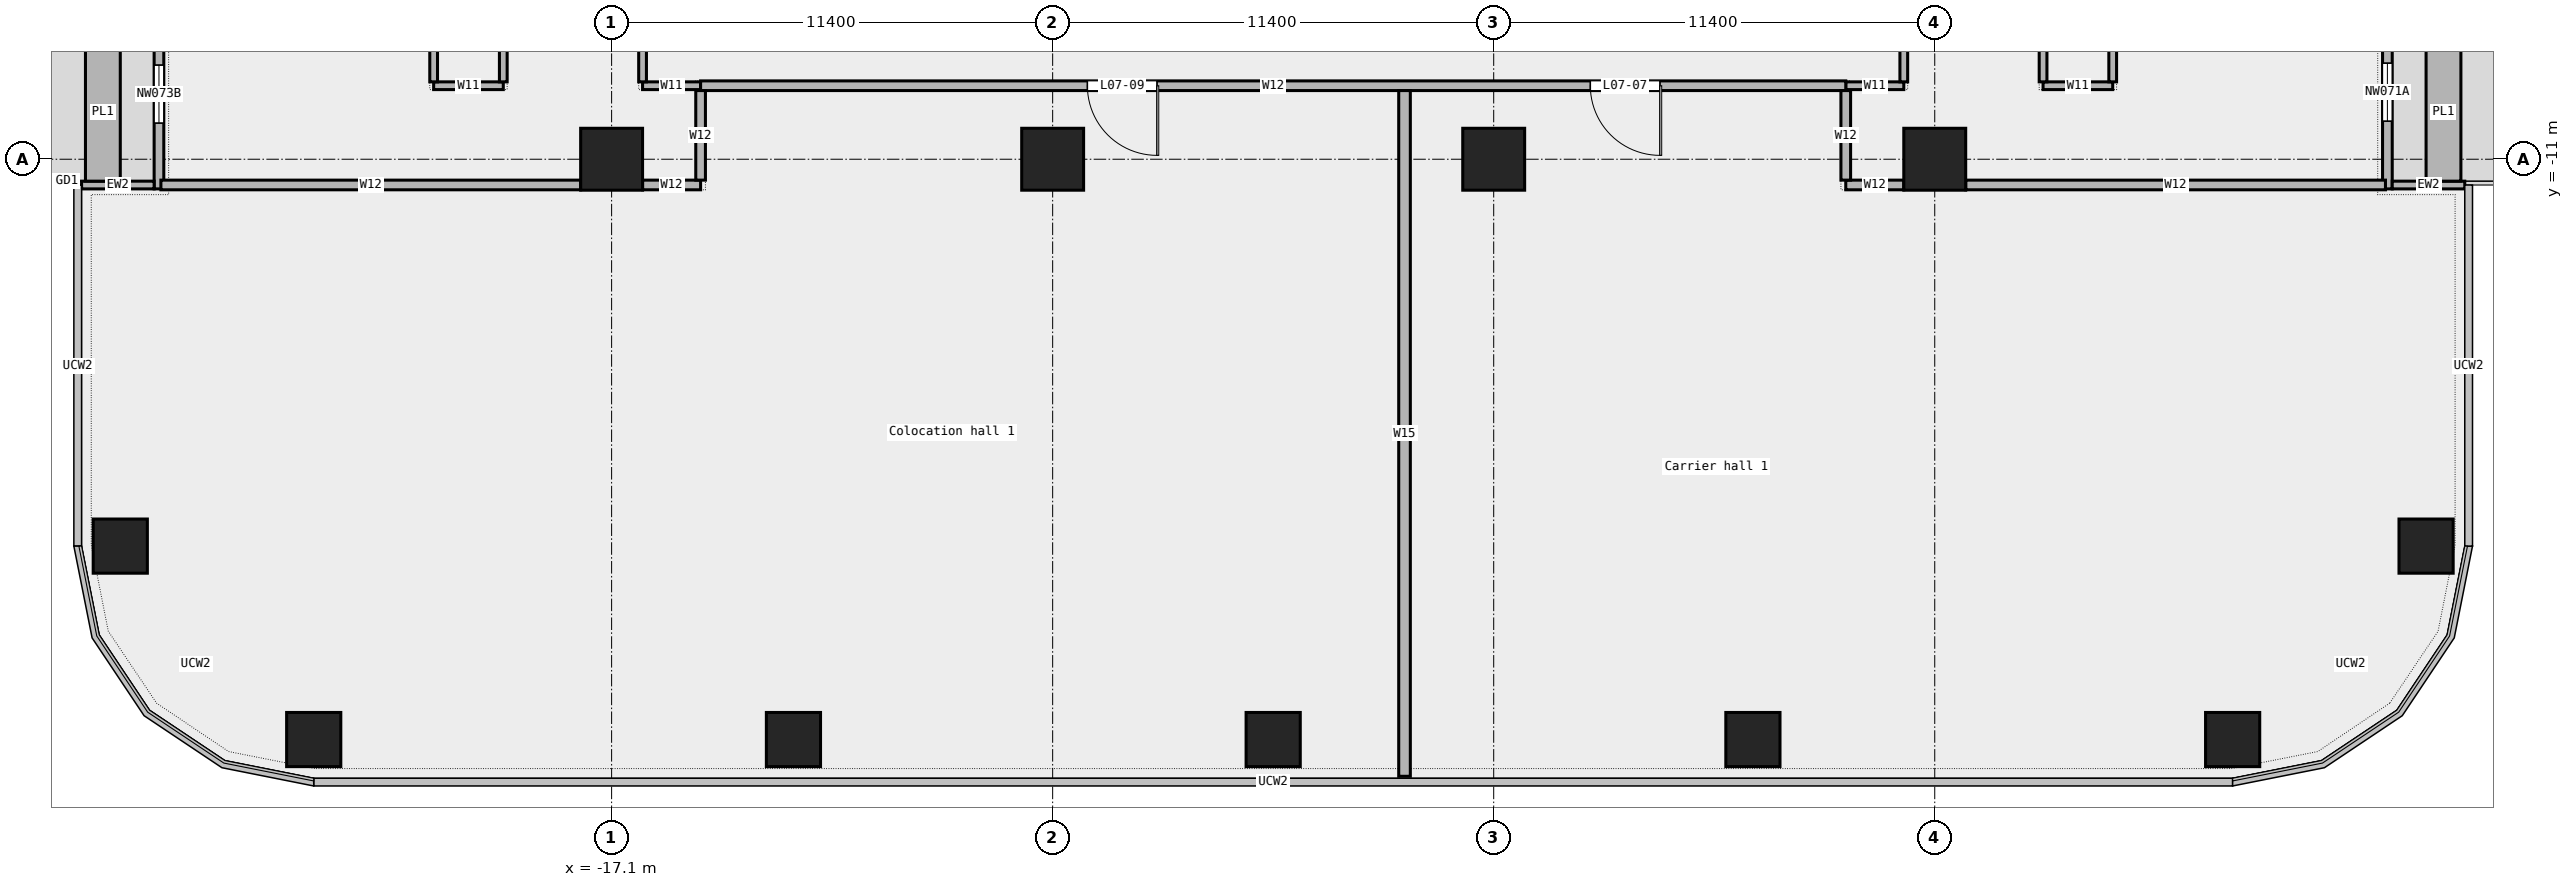
"""IFC4 building model, lengths in metres.
Left out: names, types, materials, properties, quantities, classifications, styles, units other than length and angle.
Written with IfcOpenShell. Run it as: python <this file> out.ifc"""

import sys

from ifc_helpers import new_model, si_unit, direction, frame, frame_2d, origin, origin_2d, place, context, subcontext, project, spatial, rectangle, extrude, element, fill, save


model = new_model("IFC4")
c1 = context("Model", 3, precision=1e-05, world=origin(), true_north=direction((0.0, 1.0)))
c2 = subcontext(c1, "Body", "Model", "MODEL_VIEW")
j1 = project(units=[si_unit("LENGTHUNIT", "METRE"), si_unit("PLANEANGLEUNIT", "RADIAN")], contexts=[c1])
p1 = place(None, origin())
s1 = spatial("IfcSite", under=j1, at=p1, CompositionType="ELEMENT")
p2 = place(p1, origin())
s2 = spatial("IfcBuilding", under=s1, at=p2, CompositionType="ELEMENT")
p3 = place(p2, frame((0.0, 0.0, 40.6)))
s3 = spatial("IfcBuildingStorey", under=s2, at=p3, CompositionType="ELEMENT", Elevation=40.6)
for number, where, z_axis, x_axis in (
    (1, (-24.8, -26.0, 0.0), (0.0, 0.0, 1.0), (1.0, 0.0, 0.0)),
    (2, (-12.4, -26.0, 0.0), (0.0, 0.0, 1.0), (1.0, 0.0, 0.0)),
    (3, (0.0, -26.0, 0.0), (0.0, 0.0, 1.0), (1.0, 0.0, 0.0)),
    (4, (12.4, -26.0, 0.0), (0.0, 0.0, 1.0), (1.0, 0.0, 0.0)),
    (5, (24.8, -26.0, 0.0), (0.0, 0.0, 1.0), (1.0, 0.0, 0.0)),
    (6, (29.8, -21.0, 0.0), (0.0, 0.0, 1.0), (1.0, 0.0, 0.0)),
    (7, (-29.8, -21.0, 0.0), (0.0, 0.0, 1.0), (1.0, 0.0, 0.0)),
):
    element("IfcColumn", number, at=place(p3, frame(where, z_axis=z_axis, x_axis=x_axis)), inside=s3, PredefinedType="COLUMN", context=c2, shape_type="SweptSolid", body=[
        extrude(rectangle(XDim=1.4, YDim=1.4, at=origin_2d()), origin(), (0.0, 0.0, 1.0), 4.35),
    ])
for number, where, z_axis, x_axis in (
    (8, (-17.1, -11.0, 0.0), (0.0, 0.0, 1.0), (1.0, 0.0, 0.0)),
    (9, (-5.7, -11.0, 0.0), (0.0, 0.0, 1.0), (1.0, 0.0, 0.0)),
    (10, (5.7, -11.0, 0.0), (0.0, 0.0, 1.0), (1.0, 0.0, 0.0)),
    (11, (17.1, -11.0, 0.0), (0.0, 0.0, 1.0), (1.0, 0.0, 0.0)),
):
    element("IfcColumn", number, at=place(p3, frame(where, z_axis=z_axis, x_axis=x_axis)), inside=s3, PredefinedType="COLUMN", context=c2, shape_type="SweptSolid", body=[
        extrude(rectangle(XDim=1.6, YDim=1.6, at=origin_2d()), origin(), (0.0, 0.0, 1.0), 4.35),
    ])
p4 = place(p3, frame((28.8, -11.767, 0.0), z_axis=(0.0, 0.0, 1.0), x_axis=(0.0, 1.0, 0.0)))
e12 = element("IfcWall", 12, at=p4, inside=s3, PredefinedType="STANDARD", context=c2, shape_type="SweptSolid", body=[
    extrude(rectangle(XDim=14.2, YDim=0.25, at=frame_2d((7.1, 0.0))), origin(), (0.0, 0.0, 1.0), 4.35),
])
p5 = place(p4, frame((1.75, 0.0, 0.45)))
e13 = element("IfcOpeningElement", 13, at=p5, cuts=e12, PredefinedType="OPENING", context=c2, shape_type="SweptSolid", body=[
    extrude(rectangle(XDim=1.5, YDim=3.0, at=frame_2d((0.75, 1.5))), frame((0.0, 0.137, 0.0), z_axis=(0.0, -1.0, 0.0), x_axis=(1.0, 0.0, 0.0)), (0.0, 0.0, 1.0), 0.274),
])
p6 = place(p4, frame((6.25, 0.0, 0.0)))
e14 = element("IfcOpeningElement", 14, at=p6, cuts=e12, PredefinedType="OPENING", context=c2, shape_type="SweptSolid", body=[
    extrude(rectangle(XDim=1.8, YDim=2.4, at=frame_2d((0.9, 1.2))), frame((0.0, 0.137, 0.0), z_axis=(0.0, -1.0, 0.0), x_axis=(1.0, 0.0, 0.0)), (0.0, 0.0, 1.0), 0.274),
])
p7 = place(p4, frame((11.0, 0.0, 0.45)))
e15 = element("IfcOpeningElement", 15, at=p7, cuts=e12, PredefinedType="OPENING", context=c2, shape_type="SweptSolid", body=[
    extrude(rectangle(XDim=1.5, YDim=3.0, at=frame_2d((0.75, 1.5))), frame((0.0, 0.137, 0.0), z_axis=(0.0, -1.0, 0.0), x_axis=(1.0, 0.0, 0.0)), (0.0, 0.0, 1.0), 0.274),
])
p8 = place(p3, frame((30.8, -11.667, 0.0), z_axis=(0.0, 0.0, 1.0), x_axis=(-1.0, 0.0, 0.0)))
e16 = element("IfcWall", 16, at=p8, inside=s3, PredefinedType="STANDARD", context=c2, shape_type="SweptSolid", body=[
    extrude(rectangle(XDim=1.875, YDim=0.2, at=frame_2d((0.938, 0.0))), origin(), (0.0, 0.0, 1.0), 4.35),
])
p9 = place(p3, frame((30.25, -11.567, 0.0), z_axis=(0.0, 0.0, 1.0), x_axis=(0.0, 1.0, 0.0)))
e17 = element("IfcWall", 17, at=p9, inside=s3, PredefinedType="STANDARD", context=c2, shape_type="SweptSolid", body=[
    extrude(rectangle(XDim=3.6, YDim=0.9, at=frame_2d((1.8, 0.0))), origin(), (0.0, 0.0, 1.0), 0.7),
])
p10 = place(p3, frame((-28.8, 2.433, 0.0), z_axis=(0.0, 0.0, 1.0), x_axis=(0.0, -1.0, 0.0)))
e18 = element("IfcWall", 18, at=p10, inside=s3, PredefinedType="STANDARD", context=c2, shape_type="SweptSolid", body=[
    extrude(rectangle(XDim=14.2, YDim=0.25, at=frame_2d((7.1, 0.0))), origin(), (0.0, 0.0, 1.0), 4.35),
])
p11 = place(p10, frame((1.75, 0.0, 0.45)))
e19 = element("IfcOpeningElement", 19, at=p11, cuts=e18, PredefinedType="OPENING", context=c2, shape_type="SweptSolid", body=[
    extrude(rectangle(XDim=1.5, YDim=3.0, at=frame_2d((0.75, 1.5))), frame((0.0, 0.137, 0.0), z_axis=(0.0, -1.0, 0.0), x_axis=(1.0, 0.0, 0.0)), (0.0, 0.0, 1.0), 0.274),
])
p12 = place(p10, frame((6.25, 0.0, 0.0)))
e20 = element("IfcOpeningElement", 20, at=p12, cuts=e18, PredefinedType="OPENING", context=c2, shape_type="SweptSolid", body=[
    extrude(rectangle(XDim=1.8, YDim=2.4, at=frame_2d((0.9, 1.2))), frame((0.0, 0.137, 0.0), z_axis=(0.0, -1.0, 0.0), x_axis=(1.0, 0.0, 0.0)), (0.0, 0.0, 1.0), 0.274),
])
p13 = place(p10, frame((11.0, 0.0, 0.45)))
e21 = element("IfcOpeningElement", 21, at=p13, cuts=e18, PredefinedType="OPENING", context=c2, shape_type="SweptSolid", body=[
    extrude(rectangle(XDim=1.5, YDim=3.0, at=frame_2d((0.75, 1.5))), frame((0.0, 0.137, 0.0), z_axis=(0.0, -1.0, 0.0), x_axis=(1.0, 0.0, 0.0)), (0.0, 0.0, 1.0), 0.274),
])
p14 = place(p3, frame((-30.8, -11.667, 0.0), z_axis=(0.0, 0.0, 1.0), x_axis=(1.0, 0.0, 0.0)))
e22 = element("IfcWall", 22, at=p14, inside=s3, PredefinedType="STANDARD", context=c2, shape_type="SweptSolid", body=[
    extrude(rectangle(XDim=1.875, YDim=0.2, at=frame_2d((0.938, 0.0))), origin(), (0.0, 0.0, 1.0), 4.35),
])
p15 = place(p3, frame((-30.25, -7.967, 0.0), z_axis=(0.0, 0.0, 1.0), x_axis=(0.0, -1.0, 0.0)))
e23 = element("IfcWall", 23, at=p15, inside=s3, PredefinedType="STANDARD", context=c2, shape_type="SweptSolid", body=[
    extrude(rectangle(XDim=3.6, YDim=0.9, at=frame_2d((1.8, 0.0))), origin(), (0.0, 0.0, 1.0), 0.7),
])
p16 = place(p3, frame((-28.75, -11.665, 0.0), z_axis=(0.0, 0.0, 1.0), x_axis=(1.0, 0.0, 0.0)))
e24 = element("IfcWall", 24, at=p16, inside=s3, PredefinedType="PARTITIONING", context=c2, shape_type="SweptSolid", body=[
    extrude(rectangle(XDim=10.85, YDim=0.25, at=frame_2d((5.425, 0.0))), origin(), (0.0, 0.0, 1.0), 4.35),
])
for number, where, z_axis, x_axis in (
    (25, (-16.3, -11.665, 0.0), (0.0, 0.0, 1.0), (1.0, 0.0, 0.0)),
    (26, (14.8, -11.665, 0.0), (0.0, 0.0, 1.0), (1.0, 0.0, 0.0)),
):
    element("IfcWall", number, at=place(p3, frame(where, z_axis=z_axis, x_axis=x_axis)), inside=s3, PredefinedType="PARTITIONING", context=c2, shape_type="SweptSolid", body=[
        extrude(rectangle(XDim=1.5, YDim=0.25, at=frame_2d((0.75, 0.0))), origin(), (0.0, 0.0, 1.0), 4.35),
    ])
p17 = place(p3, frame((17.9, -11.665, 0.0), z_axis=(0.0, 0.0, 1.0), x_axis=(1.0, 0.0, 0.0)))
e27 = element("IfcWall", 27, at=p17, inside=s3, PredefinedType="PARTITIONING", context=c2, shape_type="SweptSolid", body=[
    extrude(rectangle(XDim=10.85, YDim=0.25, at=frame_2d((5.425, 0.0))), origin(), (0.0, 0.0, 1.0), 4.35),
])
p18 = place(p3, frame((-21.7, -9.1, 0.0), z_axis=(0.0, 0.0, 1.0), x_axis=(1.0, 0.0, 0.0)))
e28 = element("IfcWall", 28, at=p18, inside=s3, PredefinedType="PARTITIONING", context=c2, shape_type="SweptSolid", body=[
    extrude(rectangle(XDim=1.8, YDim=0.2, at=frame_2d((0.9, 0.0))), origin(), (0.0, 0.0, 1.0), 4.35),
])
for number, where, z_axis, x_axis in (
    (29, (-16.3, -9.1, 0.0), (0.0, 0.0, 1.0), (1.0, 0.0, 0.0)),
    (30, (14.8, -9.1, 0.0), (0.0, 0.0, 1.0), (1.0, 0.0, 0.0)),
):
    element("IfcWall", number, at=place(p3, frame(where, z_axis=z_axis, x_axis=x_axis)), inside=s3, PredefinedType="PARTITIONING", context=c2, shape_type="SweptSolid", body=[
        extrude(rectangle(XDim=1.5, YDim=0.2, at=frame_2d((0.75, 0.0))), origin(), (0.0, 0.0, 1.0), 4.35),
    ])
p19 = place(p3, frame((19.9, -9.1, 0.0), z_axis=(0.0, 0.0, 1.0), x_axis=(1.0, 0.0, 0.0)))
e31 = element("IfcWall", 31, at=p19, inside=s3, PredefinedType="PARTITIONING", context=c2, shape_type="SweptSolid", body=[
    extrude(rectangle(XDim=1.8, YDim=0.2, at=frame_2d((0.9, 0.0))), origin(), (0.0, 0.0, 1.0), 4.35),
])
p20 = place(p3, frame((-14.8, -9.1, 0.0), z_axis=(0.0, 0.0, 1.0), x_axis=(1.0, 0.0, 0.0)))
e32 = element("IfcWall", 32, at=p20, inside=s3, PredefinedType="PARTITIONING", context=c2, shape_type="SweptSolid", body=[
    extrude(rectangle(XDim=29.6, YDim=0.25, at=frame_2d((14.8, 0.0))), origin(), (0.0, 0.0, 1.0), 4.35),
])
p21 = place(p20, frame((22.998, 0.0, 0.0)))
e33 = element("IfcOpeningElement", 33, at=p21, cuts=e32, PredefinedType="OPENING", context=c2, shape_type="SweptSolid", body=[
    extrude(rectangle(XDim=1.8, YDim=2.1, at=frame_2d((0.9, 1.05))), frame((0.0, 0.137, 0.0), z_axis=(0.0, -1.0, 0.0), x_axis=(1.0, 0.0, 0.0)), (0.0, 0.0, 1.0), 0.274),
])
p22 = place(p20, frame((9.998, 0.0, 0.0)))
e34 = element("IfcOpeningElement", 34, at=p22, cuts=e32, PredefinedType="OPENING", context=c2, shape_type="SweptSolid", body=[
    extrude(rectangle(XDim=1.8, YDim=2.1, at=frame_2d((0.9, 1.05))), frame((0.0, 0.137, 0.0), z_axis=(0.0, -1.0, 0.0), x_axis=(1.0, 0.0, 0.0)), (0.0, 0.0, 1.0), 0.274),
])
p23 = place(p3, frame((-21.7, -9.0, 0.0), z_axis=(0.0, 0.0, 1.0), x_axis=(0.0, 1.0, 0.0)))
e35 = element("IfcWall", 35, at=p23, inside=s3, PredefinedType="PARTITIONING", context=c2, shape_type="SweptSolid", body=[
    extrude(rectangle(XDim=11.21, YDim=0.2, at=frame_2d((5.605, 0.0))), origin(), (0.0, 0.0, 1.0), 4.35),
])
p24 = place(p23, frame((4.705, 0.0, 0.0)))
e36 = element("IfcOpeningElement", 36, at=p24, cuts=e35, PredefinedType="OPENING", context=c2, shape_type="SweptSolid", body=[
    extrude(rectangle(XDim=1.8, YDim=2.1, at=frame_2d((0.9, 1.05))), frame((0.0, 0.112, 0.0), z_axis=(0.0, -1.0, 0.0), x_axis=(1.0, 0.0, 0.0)), (0.0, 0.0, 1.0), 0.224),
])
p25 = place(p3, frame((-19.9, -9.0, 0.0), z_axis=(0.0, 0.0, 1.0), x_axis=(0.0, 1.0, 0.0)))
e37 = element("IfcWall", 37, at=p25, inside=s3, PredefinedType="PARTITIONING", context=c2, shape_type="SweptSolid", body=[
    extrude(rectangle(XDim=11.15, YDim=0.2, at=frame_2d((5.575, 0.0))), origin(), (0.0, 0.0, 1.0), 4.35),
])
p26 = place(p3, frame((-16.3, -9.0, 0.0), z_axis=(0.0, 0.0, 1.0), x_axis=(0.0, 1.0, 0.0)))
e38 = element("IfcWall", 38, at=p26, inside=s3, PredefinedType="PARTITIONING", context=c2, shape_type="SweptSolid", body=[
    extrude(rectangle(XDim=8.2, YDim=0.2, at=frame_2d((4.1, 0.0))), origin(), (0.0, 0.0, 1.0), 4.35),
])
p27 = place(p3, frame((-14.8, -11.54, 0.0), z_axis=(0.0, 0.0, 1.0), x_axis=(0.0, 1.0, 0.0)))
e39 = element("IfcWall", 39, at=p27, inside=s3, PredefinedType="PARTITIONING", context=c2, shape_type="SweptSolid", body=[
    extrude(rectangle(XDim=2.315, YDim=0.25, at=frame_2d((1.157, 0.0))), origin(), (0.0, 0.0, 1.0), 4.35),
])
p28 = place(p3, frame((3.395, -26.95, 0.0), z_axis=(0.0, 0.0, 1.0), x_axis=(0.0, 1.0, 0.0)))
e40 = element("IfcWall", 40, at=p28, inside=s3, PredefinedType="PARTITIONING", context=c2, shape_type="SweptSolid", body=[
    extrude(rectangle(XDim=17.725, YDim=0.3, at=frame_2d((8.862, 0.0))), origin(), (0.0, 0.0, 1.0), 4.35),
])
p29 = place(p3, frame((14.8, -11.54, 0.0), z_axis=(0.0, 0.0, 1.0), x_axis=(0.0, 1.0, 0.0)))
e41 = element("IfcWall", 41, at=p29, inside=s3, PredefinedType="PARTITIONING", context=c2, shape_type="SweptSolid", body=[
    extrude(rectangle(XDim=2.315, YDim=0.25, at=frame_2d((1.157, 0.0))), origin(), (0.0, 0.0, 1.0), 4.35),
])
p30 = place(p3, frame((16.3, -9.0, 0.0), z_axis=(0.0, 0.0, 1.0), x_axis=(0.0, 1.0, 0.0)))
e42 = element("IfcWall", 42, at=p30, inside=s3, PredefinedType="PARTITIONING", context=c2, shape_type="SweptSolid", body=[
    extrude(rectangle(XDim=8.2, YDim=0.2, at=frame_2d((4.1, 0.0))), origin(), (0.0, 0.0, 1.0), 4.35),
])
p31 = place(p3, frame((19.9, -9.0, 0.0), z_axis=(0.0, 0.0, 1.0), x_axis=(0.0, 1.0, 0.0)))
e43 = element("IfcWall", 43, at=p31, inside=s3, PredefinedType="PARTITIONING", context=c2, shape_type="SweptSolid", body=[
    extrude(rectangle(XDim=9.925, YDim=0.2, at=frame_2d((4.962, 0.0))), origin(), (0.0, 0.0, 1.0), 4.35),
])
p32 = place(p3, frame((21.7, -9.0, 0.0), z_axis=(0.0, 0.0, 1.0), x_axis=(0.0, 1.0, 0.0)))
e44 = element("IfcWall", 44, at=p32, inside=s3, PredefinedType="PARTITIONING", context=c2, shape_type="SweptSolid", body=[
    extrude(rectangle(XDim=24.275, YDim=0.2, at=frame_2d((12.137, 0.0))), origin(), (0.0, 0.0, 1.0), 4.35),
])
p33 = place(p32, frame((4.768, 0.0, 0.0)))
e45 = element("IfcOpeningElement", 45, at=p33, cuts=e44, PredefinedType="OPENING", context=c2, shape_type="SweptSolid", body=[
    extrude(rectangle(XDim=1.8, YDim=2.1, at=frame_2d((0.9, 1.05))), frame((0.0, 0.112, 0.0), z_axis=(0.0, -1.0, 0.0), x_axis=(1.0, 0.0, 0.0)), (0.0, 0.0, 1.0), 0.224),
])
p34 = place(p32, frame((17.055, 0.0, 0.0)))
e46 = element("IfcOpeningElement", 46, at=p34, cuts=e44, PredefinedType="OPENING", context=c2, shape_type="SweptSolid", body=[
    extrude(rectangle(XDim=1.5, YDim=2.1, at=frame_2d((0.75, 1.05))), frame((0.0, 0.112, 0.0), z_axis=(0.0, -1.0, 0.0), x_axis=(1.0, 0.0, 0.0)), (0.0, 0.0, 1.0), 0.224),
])
p35 = place(p5, origin())
e47 = element("IfcWindow", 47, at=p35, inside=s3, PartitioningType="SINGLE_PANEL", PredefinedType="WINDOW", context=c2, shape_type="SweptSolid", body=[
    extrude(rectangle(XDim=1.5, YDim=3.0, at=frame_2d((0.75, 1.5))), frame((0.0, 0.03, 0.0), z_axis=(0.0, -1.0, 0.0), x_axis=(1.0, 0.0, 0.0)), (0.0, 0.0, 1.0), 0.06),
])
fill(e13, e47)
p36 = place(p13, origin())
e48 = element("IfcWindow", 48, at=p36, inside=s3, PartitioningType="SINGLE_PANEL", PredefinedType="WINDOW", context=c2, shape_type="SweptSolid", body=[
    extrude(rectangle(XDim=1.5, YDim=3.0, at=frame_2d((0.75, 1.5))), frame((0.0, 0.03, 0.0), z_axis=(0.0, -1.0, 0.0), x_axis=(1.0, 0.0, 0.0)), (0.0, 0.0, 1.0), 0.06),
])
fill(e21, e48)
p37 = place(p21, origin())
e49 = element("IfcDoor", 49, at=p37, inside=s3, OperationType="DOUBLE_DOOR_SINGLE_SWING", PredefinedType="DOOR", context=c2, shape_type="SweptSolid", body=[
    extrude(rectangle(XDim=1.8, YDim=2.1, at=frame_2d((0.9, 1.05))), frame((0.0, 0.025, 0.0), z_axis=(0.0, -1.0, 0.0), x_axis=(1.0, 0.0, 0.0)), (0.0, 0.0, 1.0), 0.05),
])
fill(e33, e49)
p38 = place(p22, origin())
e50 = element("IfcDoor", 50, at=p38, inside=s3, OperationType="DOUBLE_DOOR_SINGLE_SWING", PredefinedType="DOOR", context=c2, shape_type="SweptSolid", body=[
    extrude(rectangle(XDim=1.8, YDim=2.1, at=frame_2d((0.9, 1.05))), frame((0.0, 0.025, 0.0), z_axis=(0.0, -1.0, 0.0), x_axis=(1.0, 0.0, 0.0)), (0.0, 0.0, 1.0), 0.05),
])
fill(e34, e50)
save(model, sys.argv[1])
